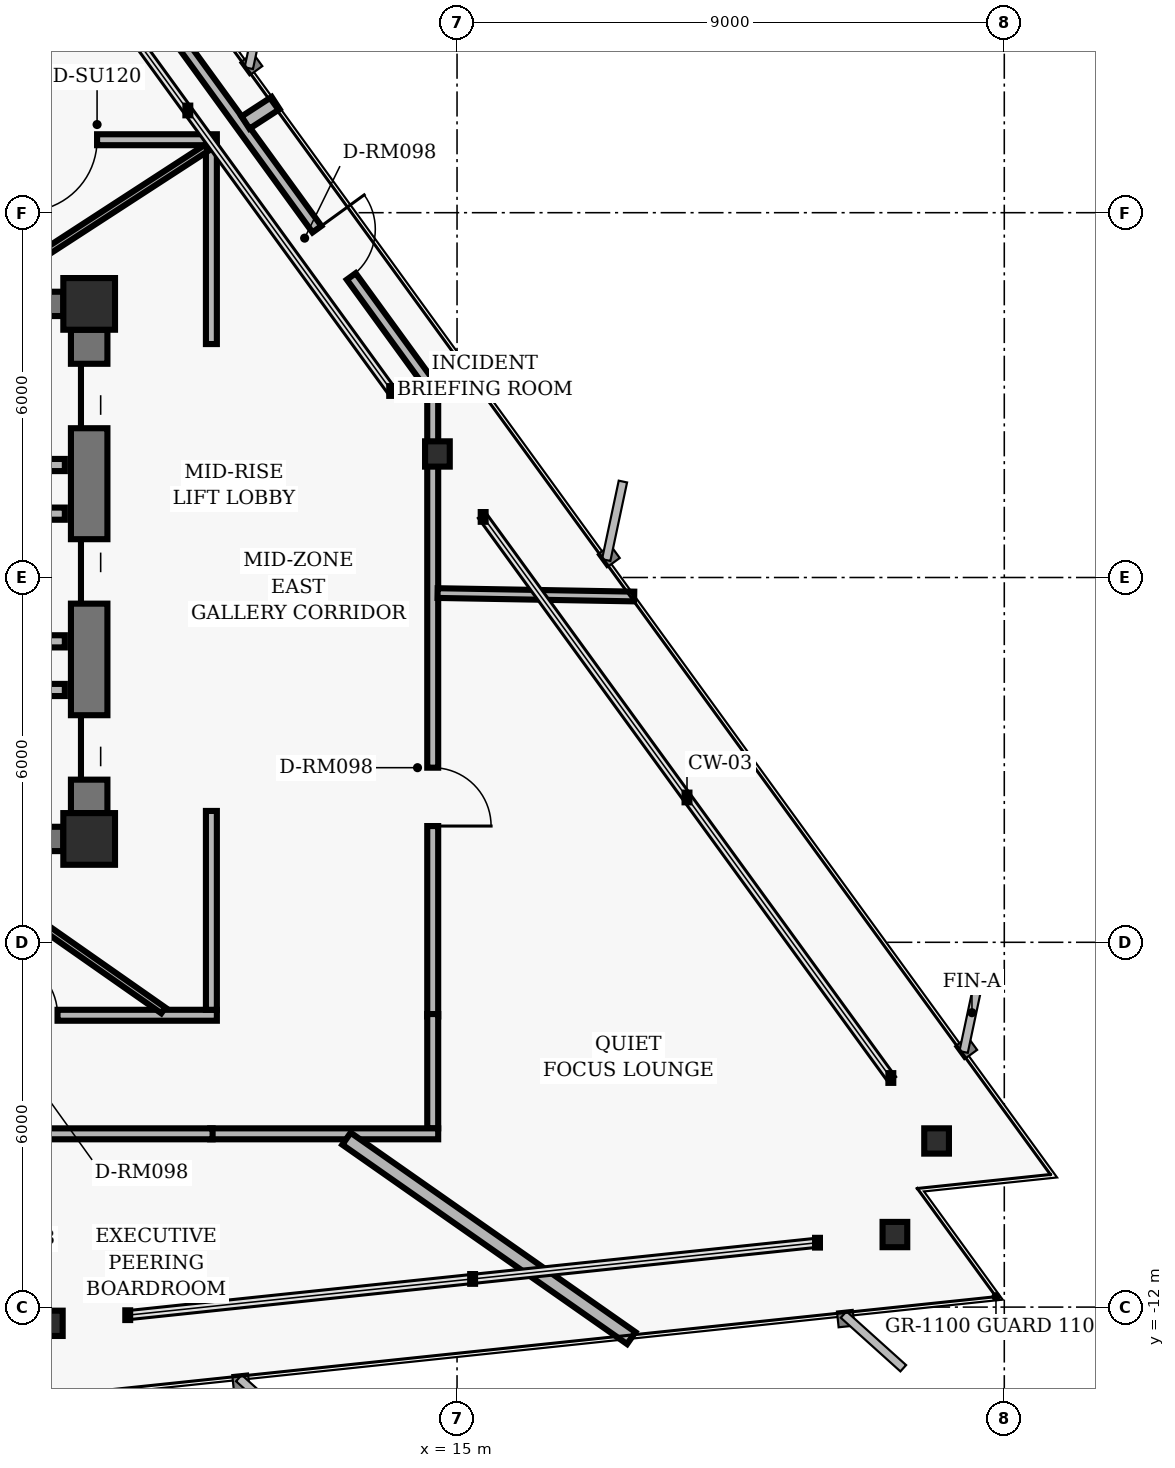
"""IFC4 building model, lengths in metres.
Left out: names, types, materials, properties, quantities, classifications, styles, units other than length and angle.
Written with IfcOpenShell. Run it as: python <this file> out.ifc"""

import sys

from ifc_helpers import new_model, si_unit, direction, frame, frame_2d, origin, origin_2d, place, context, subcontext, project, spatial, rectangle, hollow_rectangle, i_section, extrude, element, fill, save


model = new_model("IFC4")
c1 = context("Model", 3, precision=1e-05, world=origin(), true_north=direction((0.0, 1.0)))
c2 = subcontext(c1, "Body", "Model", "MODEL_VIEW")
j1 = project(units=[si_unit("LENGTHUNIT", "METRE"), si_unit("PLANEANGLEUNIT", "RADIAN")], contexts=[c1])
p1 = place(None, origin())
s1 = spatial("IfcSite", under=j1, at=p1, CompositionType="ELEMENT")
p2 = place(p1, origin())
s2 = spatial("IfcBuilding", under=s1, at=p2, CompositionType="ELEMENT")
p3 = place(p2, frame((0.0, 0.0, 116.8)))
s3 = spatial("IfcBuildingStorey", under=s2, at=p3, CompositionType="ELEMENT", Elevation=116.8)
for number, where, z_axis, x_axis in (
    (1, (8.95, 4.5, 0.0), (0.0, 0.0, 1.0), (1.0, 0.0, 0.0)),
    (2, (8.95, -4.3, 0.0), (0.0, 0.0, 1.0), (1.0, 0.0, 0.0)),
):
    element("IfcColumn", number, at=place(p3, frame(where, z_axis=z_axis, x_axis=x_axis)), inside=s3, PredefinedType="COLUMN", context=c2, shape_type="SweptSolid", body=[
        extrude(hollow_rectangle(XDim=0.85, YDim=0.85, WallThickness=0.055, InnerFilletRadius=0.02, OuterFilletRadius=0.04, at=origin_2d()), origin(), (0.0, 0.0, 1.0), 3.04),
    ])
p4 = place(p3, frame((8.95, -3.875, 0.0), z_axis=(0.0, 0.0, 1.0), x_axis=(0.0, 1.0, 0.0)))
e3 = element("IfcWall", 3, at=p4, inside=s3, PredefinedType="SHEAR", context=c2, shape_type="SweptSolid", body=[
    extrude(rectangle(XDim=7.95, YDim=0.6, at=frame_2d((3.975, 0.0))), origin(), (0.0, 0.0, 1.0), 2.788),
])
p5 = place(p4, frame((0.55, 0.0, 0.0)))
e4 = element("IfcOpeningElement", 4, at=p5, cuts=e3, PredefinedType="OPENING", context=c2, shape_type="SweptSolid", body=[
    extrude(rectangle(XDim=1.06, YDim=2.04, at=frame_2d((0.53, 1.02))), frame((0.0, 0.31, 0.0), z_axis=(0.0, -1.0, 0.0), x_axis=(1.0, 0.0, 0.0)), (0.0, 0.0, 1.0), 0.62),
])
p6 = place(p4, frame((3.445, 0.0, 0.0)))
e5 = element("IfcOpeningElement", 5, at=p6, cuts=e3, PredefinedType="OPENING", context=c2, shape_type="SweptSolid", body=[
    extrude(rectangle(XDim=1.06, YDim=2.04, at=frame_2d((0.53, 1.02))), frame((0.0, 0.31, 0.0), z_axis=(0.0, -1.0, 0.0), x_axis=(1.0, 0.0, 0.0)), (0.0, 0.0, 1.0), 0.62),
])
p7 = place(p4, frame((6.33, 0.0, 0.0)))
e6 = element("IfcOpeningElement", 6, at=p7, cuts=e3, PredefinedType="OPENING", context=c2, shape_type="SweptSolid", body=[
    extrude(rectangle(XDim=1.06, YDim=2.04, at=frame_2d((0.53, 1.02))), frame((0.0, 0.31, 0.0), z_axis=(0.0, -1.0, 0.0), x_axis=(1.0, 0.0, 0.0)), (0.0, 0.0, 1.0), 0.62),
])
for number, where, z_axis, x_axis in (
    (7, (6.475, 4.5, 0.0), (0.0, 0.0, 1.0), (1.0, 0.0, 0.0)),
    (8, (6.475, -4.3, 0.0), (0.0, 0.0, 1.0), (1.0, 0.0, 0.0)),
):
    element("IfcWall", number, at=place(p3, frame(where, z_axis=z_axis, x_axis=x_axis)), inside=s3, PredefinedType="SHEAR", context=c2, shape_type="SweptSolid", body=[
        extrude(rectangle(XDim=2.05, YDim=0.4, at=frame_2d((1.025, 0.0))), origin(), (0.0, 0.0, 1.0), 2.788),
    ])
for number, where, z_axis, x_axis in (
    (9, (22.887, -9.268, 0.0), (0.0, 0.0, 1.0), (1.0, 0.0, 0.0)),
    (10, (14.677, 2.032, 0.0), (0.0, 0.0, 1.0), (1.0, 0.0, 0.0)),
    (11, (8.311, -12.267, 0.0), (0.0, 0.0, 1.0), (1.0, 0.0, 0.0)),
    (12, (22.201, -10.807, 0.0), (0.0, 0.0, 1.0), (1.0, 0.0, 0.0)),
):
    element("IfcColumn", number, at=place(p3, frame(where, z_axis=z_axis, x_axis=x_axis)), inside=s3, PredefinedType="COLUMN", context=c2, shape_type="SweptSolid", body=[
        extrude(i_section(OverallWidth=0.406, OverallDepth=0.416, WebThickness=0.03, FlangeThickness=0.048, FilletRadius=0.02, at=origin_2d()), origin(), (0.0, 0.0, 1.0), 3.04),
    ])
for number, where, z_axis, x_axis in (
    (13, (6.45, -1.85, 0.0), (0.0, 0.0, 1.0), (1.0, 0.0, 0.0)),
    (14, (6.45, 1.85, 0.0), (0.0, 0.0, 1.0), (1.0, 0.0, 0.0)),
):
    element("IfcWall", number, at=place(p3, frame(where, z_axis=z_axis, x_axis=x_axis)), inside=s3, PredefinedType="PARTITIONING", context=c2, shape_type="SweptSolid", body=[
        extrude(rectangle(XDim=2.1, YDim=0.2, at=frame_2d((1.05, 0.0))), origin(), (0.0, 0.0, 1.0), 2.763),
    ])
for number, where, z_axis, x_axis in (
    (15, (6.64, -1.05, 0.0), (0.0, 0.0, 1.0), (1.0, 0.0, 0.0)),
    (16, (6.64, 1.05, 0.0), (0.0, 0.0, 1.0), (1.0, 0.0, 0.0)),
):
    element("IfcWall", number, at=place(p3, frame(where, z_axis=z_axis, x_axis=x_axis)), inside=s3, PredefinedType="PARTITIONING", context=c2, shape_type="SweptSolid", body=[
        extrude(rectangle(XDim=1.91, YDim=0.2, at=frame_2d((0.955, 0.0))), origin(), (0.0, 0.0, 1.0), 2.763),
    ])
p8 = place(p3, frame((10.263, 9.077, 0.0), z_axis=(0.0, 0.0, 1.0), x_axis=(0.587780951295, -0.809020119215, 0.0)))
e17 = element("IfcWall", 17, at=p8, inside=s3, PredefinedType="PARTITIONING", context=c2, shape_type="SweptSolid", body=[
    extrude(rectangle(XDim=7.469, YDim=0.18, at=frame_2d((3.734, 0.0))), origin(), (0.0, 0.0, 1.0), 2.763),
])
p9 = place(p8, frame((4.139, 0.0, 0.0)))
e18 = element("IfcOpeningElement", 18, at=p9, cuts=e17, PredefinedType="OPENING", context=c2, shape_type="SweptSolid", body=[
    extrude(rectangle(XDim=0.96, YDim=2.02, at=frame_2d((0.48, 1.01))), frame((0.0, 0.1, 0.0), z_axis=(0.0, -1.0, 0.0), x_axis=(1.0, 0.0, 0.0)), (0.0, 0.0, 1.0), 0.2),
])
p10 = place(p3, frame((14.6, 3.018, 0.0), z_axis=(0.0, 0.0, 1.0), x_axis=(0.0, -1.0, 0.0)))
e19 = element("IfcWall", 19, at=p10, inside=s3, PredefinedType="PARTITIONING", context=c2, shape_type="SweptSolid", body=[
    extrude(rectangle(XDim=10.238, YDim=0.18, at=frame_2d((5.119, 0.0))), origin(), (0.0, 0.0, 1.0), 2.763),
])
p11 = place(p10, frame((6.146, 0.0, 0.0)))
e20 = element("IfcOpeningElement", 20, at=p11, cuts=e19, PredefinedType="OPENING", context=c2, shape_type="SweptSolid", body=[
    extrude(rectangle(XDim=0.96, YDim=2.02, at=frame_2d((0.48, 1.01))), frame((0.0, 0.1, 0.0), z_axis=(0.0, -1.0, 0.0), x_axis=(1.0, 0.0, 0.0)), (0.0, 0.0, 1.0), 0.2),
])
p12 = place(p3, frame((14.6, -7.18, 0.0), z_axis=(0.0, 0.0, 1.0), x_axis=(0.0, -1.0, 0.0)))
e21 = element("IfcWall", 21, at=p12, inside=s3, PredefinedType="PARTITIONING", context=c2, shape_type="SweptSolid", body=[
    extrude(rectangle(XDim=1.88, YDim=0.18, at=frame_2d((0.94, 0.0))), origin(), (0.0, 0.0, 1.0), 2.763),
])
p13 = place(p3, frame((14.69, -9.15, 0.0), z_axis=(0.0, 0.0, 1.0), x_axis=(-1.0, 0.0, 0.0)))
e22 = element("IfcWall", 22, at=p13, inside=s3, PredefinedType="PARTITIONING", context=c2, shape_type="SweptSolid", body=[
    extrude(rectangle(XDim=3.75, YDim=0.18, at=frame_2d((1.875, 0.0))), origin(), (0.0, 0.0, 1.0), 2.33),
])
p14 = place(p3, frame((10.98, -9.15, 0.0), z_axis=(0.0, 0.0, 1.0), x_axis=(-1.0, 0.0, 0.0)))
e23 = element("IfcWall", 23, at=p14, inside=s3, PredefinedType="PARTITIONING", context=c2, shape_type="SweptSolid", body=[
    extrude(rectangle(XDim=17.5, YDim=0.18, at=frame_2d((8.75, 0.0))), origin(), (0.0, 0.0, 1.0), 2.33),
])
p15 = place(p14, frame((14.696, 0.0, 0.0)))
e24 = element("IfcOpeningElement", 24, at=p15, cuts=e23, PredefinedType="OPENING", context=c2, shape_type="SweptSolid", body=[
    extrude(rectangle(XDim=0.96, YDim=2.02, at=frame_2d((0.48, 1.01))), frame((0.0, 0.1, 0.0), z_axis=(0.0, -1.0, 0.0), x_axis=(1.0, 0.0, 0.0)), (0.0, 0.0, 1.0), 0.2),
])
p16 = place(p14, frame((9.764, 0.0, 0.0)))
e25 = element("IfcOpeningElement", 25, at=p16, cuts=e23, PredefinedType="OPENING", context=c2, shape_type="SweptSolid", body=[
    extrude(rectangle(XDim=1.02, YDim=2.02, at=frame_2d((0.51, 1.01))), frame((0.0, 0.1, 0.0), z_axis=(0.0, -1.0, 0.0), x_axis=(1.0, 0.0, 0.0)), (0.0, 0.0, 1.0), 0.2),
])
p17 = place(p14, frame((3.366, 0.0, 0.0)))
e26 = element("IfcOpeningElement", 26, at=p17, cuts=e23, PredefinedType="OPENING", context=c2, shape_type="SweptSolid", body=[
    extrude(rectangle(XDim=0.96, YDim=2.02, at=frame_2d((0.48, 1.01))), frame((0.0, 0.1, 0.0), z_axis=(0.0, -1.0, 0.0), x_axis=(1.0, 0.0, 0.0)), (0.0, 0.0, 1.0), 0.2),
])
p18 = place(p3, frame((5.53, -7.2, 0.0), z_axis=(0.0, 0.0, 1.0), x_axis=(1.0, 0.0, 0.0)))
e27 = element("IfcWall", 27, at=p18, inside=s3, PredefinedType="PARTITIONING", context=c2, shape_type="SweptSolid", body=[
    extrude(rectangle(XDim=5.52, YDim=0.18, at=frame_2d((2.76, 0.0))), origin(), (0.0, 0.0, 1.0), 2.33),
])
p19 = place(p18, frame((1.94, 0.0, 0.0)))
e28 = element("IfcOpeningElement", 28, at=p19, cuts=e27, PredefinedType="OPENING", context=c2, shape_type="SweptSolid", body=[
    extrude(rectangle(XDim=0.96, YDim=2.02, at=frame_2d((0.48, 1.01))), frame((0.0, 0.1, 0.0), z_axis=(0.0, -1.0, 0.0), x_axis=(1.0, 0.0, 0.0)), (0.0, 0.0, 1.0), 0.2),
])
for number, where, z_axis, x_axis in (
    (29, (10.96, -7.11, 0.0), (0.0, 0.0, 1.0), (0.0, 1.0, 0.0)),
    (30, (10.96, 3.84, 0.0), (0.0, 0.0, 1.0), (0.0, 1.0, 0.0)),
):
    element("IfcWall", number, at=place(p3, frame(where, z_axis=z_axis, x_axis=x_axis)), inside=s3, PredefinedType="PARTITIONING", context=c2, shape_type="SweptSolid", body=[
        extrude(rectangle(XDim=3.271, YDim=0.18, at=frame_2d((1.635, 0.0))), origin(), (0.0, 0.0, 1.0), 2.763),
    ])
p20 = place(p3, frame((11.05, 7.2, 0.0), z_axis=(0.0, 0.0, 1.0), x_axis=(-1.0, 0.0, 0.0)))
e31 = element("IfcWall", 31, at=p20, inside=s3, PredefinedType="PARTITIONING", context=c2, shape_type="SweptSolid", body=[
    extrude(rectangle(XDim=5.12, YDim=0.18, at=frame_2d((2.56, 0.0))), origin(), (0.0, 0.0, 1.0), 2.763),
])
p21 = place(p20, frame((1.97, 0.0, 0.0)))
e32 = element("IfcOpeningElement", 32, at=p21, cuts=e31, PredefinedType="OPENING", context=c2, shape_type="SweptSolid", body=[
    extrude(rectangle(XDim=1.18, YDim=2.02, at=frame_2d((0.59, 1.01))), frame((0.0, 0.1, 0.0), z_axis=(0.0, -1.0, 0.0), x_axis=(1.0, 0.0, 0.0)), (0.0, 0.0, 1.0), 0.2),
])
p22 = place(p3, frame((7.012, -4.91, 0.0), z_axis=(0.0, 0.0, 1.0), x_axis=(0.819130700295, -0.573606917526, 0.0)))
e33 = element("IfcWall", 33, at=p22, inside=s3, PredefinedType="MOVABLE", context=c2, shape_type="SweptSolid", body=[
    extrude(rectangle(XDim=3.853, YDim=0.115, at=frame_2d((1.927, 0.0))), origin(), (0.0, 0.0, 1.0), 2.763),
])
p23 = place(p3, frame((13.182, -9.23, 0.0), z_axis=(0.0, 0.0, 1.0), x_axis=(0.819133610169, -0.573602762102, 0.0)))
e34 = element("IfcWall", 34, at=p23, inside=s3, PredefinedType="PARTITIONING", context=c2, shape_type="SweptSolid", body=[
    extrude(rectangle(XDim=5.718, YDim=0.24, at=frame_2d((2.859, 0.0))), origin(), (0.0, 0.0, 1.0), 2.763),
])
p24 = place(p3, frame((14.68, -0.256, 0.0), z_axis=(0.0, 0.0, 1.0), x_axis=(0.999846583078, -0.017516001455, 0.0)))
e35 = element("IfcWall", 35, at=p24, inside=s3, PredefinedType="PARTITIONING", context=c2, shape_type="SweptSolid", body=[
    extrude(rectangle(XDim=3.234, YDim=0.16, at=frame_2d((1.617, 0.0))), origin(), (0.0, 0.0, 1.0), 2.763),
])
p25 = place(p3, frame((7.561, 4.91, 0.0), z_axis=(0.0, 0.0, 1.0), x_axis=(0.838633829817, 0.544695602595, 0.0)))
e36 = element("IfcWall", 36, at=p25, inside=s3, PredefinedType="MOVABLE", context=c2, shape_type="SweptSolid", body=[
    extrude(rectangle(XDim=3.958, YDim=0.115, at=frame_2d((1.979, 0.0))), origin(), (0.0, 0.0, 1.0), 2.763),
])
p26 = place(p3, frame((11.521, 7.482, 0.0), z_axis=(0.0, 0.0, 1.0), x_axis=(0.838415292805, 0.545031922726, 0.0)))
e37 = element("IfcWall", 37, at=p26, inside=s3, PredefinedType="PARTITIONING", context=c2, shape_type="SweptSolid", body=[
    extrude(rectangle(XDim=0.591, YDim=0.24, at=frame_2d((0.295, 0.0))), origin(), (0.0, 0.0, 1.0), 2.763),
])
p27 = place(p5, origin())
e38 = element("IfcDoor", 38, at=p27, inside=s3, OperationType="SLIDING_TO_LEFT", PredefinedType="DOOR", context=c2, shape_type="SweptSolid", body=[
    extrude(rectangle(XDim=1.06, YDim=2.04, at=frame_2d((0.53, 1.02))), frame((0.0, 0.025, 0.0), z_axis=(0.0, -1.0, 0.0), x_axis=(1.0, 0.0, 0.0)), (0.0, 0.0, 1.0), 0.05),
])
fill(e4, e38)
p28 = place(p6, origin())
e39 = element("IfcDoor", 39, at=p28, inside=s3, OperationType="SLIDING_TO_RIGHT", PredefinedType="DOOR", context=c2, shape_type="SweptSolid", body=[
    extrude(rectangle(XDim=1.06, YDim=2.04, at=frame_2d((0.53, 1.02))), frame((0.0, 0.025, 0.0), z_axis=(0.0, -1.0, 0.0), x_axis=(1.0, 0.0, 0.0)), (0.0, 0.0, 1.0), 0.05),
])
fill(e5, e39)
p29 = place(p7, origin())
e40 = element("IfcDoor", 40, at=p29, inside=s3, OperationType="SLIDING_TO_LEFT", PredefinedType="DOOR", context=c2, shape_type="SweptSolid", body=[
    extrude(rectangle(XDim=1.06, YDim=2.04, at=frame_2d((0.53, 1.02))), frame((0.0, 0.025, 0.0), z_axis=(0.0, -1.0, 0.0), x_axis=(1.0, 0.0, 0.0)), (0.0, 0.0, 1.0), 0.05),
])
fill(e6, e40)
p30 = place(p19, origin())
e41 = element("IfcDoor", 41, at=p30, inside=s3, OperationType="SINGLE_SWING_LEFT", PredefinedType="DOOR", context=c2, shape_type="SweptSolid", body=[
    extrude(rectangle(XDim=0.96, YDim=2.02, at=frame_2d((0.48, 1.01))), frame((0.0, 0.025, 0.0), z_axis=(0.0, -1.0, 0.0), x_axis=(1.0, 0.0, 0.0)), (0.0, 0.0, 1.0), 0.05),
])
fill(e28, e41)
p31 = place(p11, origin())
e42 = element("IfcDoor", 42, at=p31, inside=s3, OperationType="SINGLE_SWING_RIGHT", PredefinedType="DOOR", context=c2, shape_type="SweptSolid", body=[
    extrude(rectangle(XDim=0.96, YDim=2.02, at=frame_2d((0.48, 1.01))), frame((0.0, 0.025, 0.0), z_axis=(0.0, -1.0, 0.0), x_axis=(1.0, 0.0, 0.0)), (0.0, 0.0, 1.0), 0.05),
])
fill(e20, e42)
p32 = place(p9, origin())
e43 = element("IfcDoor", 43, at=p32, inside=s3, OperationType="SINGLE_SWING_LEFT", PredefinedType="DOOR", context=c2, shape_type="SweptSolid", body=[
    extrude(rectangle(XDim=0.96, YDim=2.02, at=frame_2d((0.48, 1.01))), frame((0.0, 0.025, 0.0), z_axis=(0.0, -1.0, 0.0), x_axis=(1.0, 0.0, 0.0)), (0.0, 0.0, 1.0), 0.05),
])
fill(e18, e43)
p33 = place(p21, origin())
e44 = element("IfcDoor", 44, at=p33, inside=s3, OperationType="SINGLE_SWING_RIGHT", PredefinedType="DOOR", context=c2, shape_type="SweptSolid", body=[
    extrude(rectangle(XDim=1.18, YDim=2.02, at=frame_2d((0.59, 1.01))), frame((0.0, 0.025, 0.0), z_axis=(0.0, -1.0, 0.0), x_axis=(1.0, 0.0, 0.0)), (0.0, 0.0, 1.0), 0.05),
])
fill(e32, e44)
save(model, sys.argv[1])
